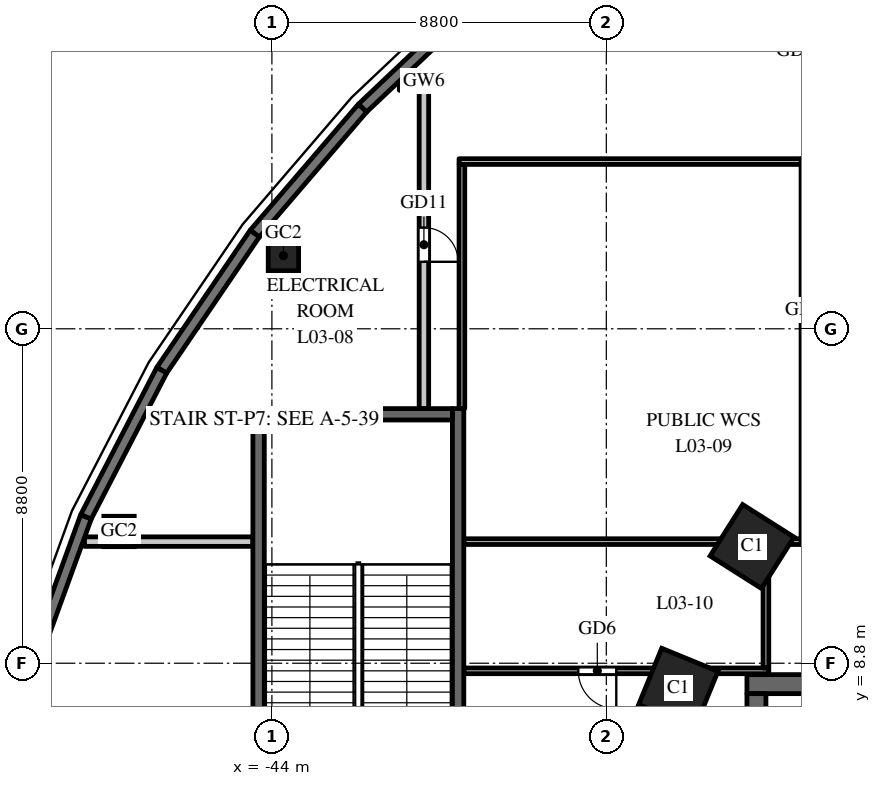
"""IFC4 building model, lengths in metres.
Left out: names, types, materials, properties, quantities, classifications, styles, units other than length and angle.
Written with IfcOpenShell. Run it as: python <this file> out.ifc"""

import sys

from ifc_helpers import new_model, si_unit, direction, frame, frame_2d, origin, origin_2d, place, context, subcontext, project, spatial, rectangle, hollow_rectangle, extrude, element, fill, save


model = new_model("IFC4")
c1 = context("Model", 3, precision=1e-05, world=origin(), true_north=direction((0.0, 1.0)))
c2 = subcontext(c1, "Body", "Model", "MODEL_VIEW")
j1 = project(units=[si_unit("LENGTHUNIT", "METRE"), si_unit("PLANEANGLEUNIT", "RADIAN")], contexts=[c1])
p1 = place(None, origin())
s1 = spatial("IfcSite", under=j1, at=p1, CompositionType="ELEMENT")
p2 = place(p1, origin())
s2 = spatial("IfcBuilding", under=s1, at=p2, CompositionType="ELEMENT")
p3 = place(p2, frame((0.0, 0.0, 19.5)))
s3 = spatial("IfcBuildingStorey", under=s2, at=p3, CompositionType="ELEMENT", Elevation=19.5)
for number, where, z_axis, x_axis in (
    (1, (-31.365, 11.871, 0.0), (0.0, 0.0, 1.0), (-0.535, -0.845, 0.0)),
    (2, (-33.305, 8.149, 0.0), (0.0, 0.0, 1.0), (-0.379, -0.925, 0.0)),
):
    element("IfcColumn", number, at=place(p3, frame(where, z_axis=z_axis, x_axis=x_axis)), inside=s3, PredefinedType="COLUMN", context=c2, shape_type="SweptSolid", body=[
        extrude(rectangle(XDim=1.6, YDim=1.6, at=origin_2d()), origin(), (0.0, 0.0, 1.0), 5.5),
    ])
p4 = place(p3, frame((-16.5, 8.25, 0.0), z_axis=(0.0, 0.0, 1.0), x_axis=(-1.0, 0.0, 0.0)))
e3 = element("IfcWall", 3, at=p4, inside=s3, PredefinedType="SHEAR", context=c2, shape_type="SweptSolid", body=[
    extrude(rectangle(XDim=15.0, YDim=0.5, at=frame_2d((7.5, 0.0))), origin(), (0.0, 0.0, 1.0), 5.25),
])
p5 = place(p4, frame((6.9, 0.0, 0.0)))
e4 = element("IfcOpeningElement", 4, at=p5, cuts=e3, PredefinedType="OPENING", context=c2, shape_type="SweptSolid", body=[
    extrude(rectangle(XDim=1.2, YDim=2.1, at=frame_2d((0.6, 1.05))), frame((0.0, 0.26, 0.0), z_axis=(0.0, -1.0, 0.0), x_axis=(1.0, 0.0, 0.0)), (0.0, 0.0, 1.0), 0.52),
])
p6 = place(p4, frame((12.05, 0.0, 0.0)))
e5 = element("IfcOpeningElement", 5, at=p6, cuts=e3, PredefinedType="OPENING", context=c2, shape_type="SweptSolid", body=[
    extrude(rectangle(XDim=0.9, YDim=2.1, at=frame_2d((0.45, 1.05))), frame((0.0, 0.26, 0.0), z_axis=(0.0, -1.0, 0.0), x_axis=(1.0, 0.0, 0.0)), (0.0, 0.0, 1.0), 0.52),
])
p7 = place(p3, frame((-31.25, -8.0, 0.0), z_axis=(0.0, 0.0, 1.0), x_axis=(0.0, 1.0, 0.0)))
e6 = element("IfcWall", 6, at=p7, inside=s3, PredefinedType="SHEAR", context=c2, shape_type="SweptSolid", body=[
    extrude(rectangle(XDim=16.0, YDim=0.5, at=frame_2d((8.0, 0.0))), origin(), (0.0, 0.0, 1.0), 5.25),
])
for number, where, z_axis, x_axis in (
    (7, (-43.696, 19.525, 0.0), (0.0, 0.0, 1.0), (1.0, 0.0, 0.0)),
    (8, (-48.022, 12.267, 0.0), (0.0, 0.0, 1.0), (1.0, 0.0, 0.0)),
):
    element("IfcColumn", number, at=place(p3, frame(where, z_axis=z_axis, x_axis=x_axis)), inside=s3, PredefinedType="COLUMN", context=c2, shape_type="SweptSolid", body=[
        extrude(hollow_rectangle(XDim=0.8, YDim=0.8, WallThickness=0.04, at=origin_2d()), origin(), (0.0, 0.0, 1.0), 5.5),
    ])
p8 = place(p3, frame((-44.5, 12.0, 0.0), z_axis=(0.0, 0.0, 1.0), x_axis=(-1.0, 0.0, 0.0)))
e9 = element("IfcWall", 9, at=p8, inside=s3, PredefinedType="PARTITIONING", context=c2, shape_type="SweptSolid", body=[
    extrude(rectangle(XDim=4.43, YDim=0.25, at=frame_2d((2.215, 0.0))), origin(), (0.0, 0.0, 1.0), 4.65),
])
p9 = place(p3, frame((-40.646, 24.0, 0.0), z_axis=(0.0, 0.0, 1.0), x_axis=(1.0, 0.0, 0.0)))
e10 = element("IfcWall", 10, at=p9, inside=s3, PredefinedType="PARTITIONING", context=c2, shape_type="SweptSolid", body=[
    extrude(rectangle(XDim=0.521, YDim=0.25, at=frame_2d((0.26, 0.0))), origin(), (0.0, 0.0, 1.0), 5.25),
])
p10 = place(p3, frame((-40.0, 24.125, 0.0), z_axis=(0.0, 0.0, 1.0), x_axis=(0.0, -1.0, 0.0)))
e11 = element("IfcWall", 11, at=p10, inside=s3, PredefinedType="PARTITIONING", context=c2, shape_type="SweptSolid", body=[
    extrude(rectangle(XDim=8.625, YDim=0.25, at=frame_2d((4.312, 0.0))), origin(), (0.0, 0.0, 1.0), 4.25),
])
p11 = place(p10, frame((3.863, 0.0, 0.0)))
e12 = element("IfcOpeningElement", 12, at=p11, cuts=e11, PredefinedType="OPENING", context=c2, shape_type="SweptSolid", body=[
    extrude(rectangle(XDim=0.9, YDim=2.1, at=frame_2d((0.45, 1.05))), frame((0.0, 0.135, 0.0), z_axis=(0.0, -1.0, 0.0), x_axis=(1.0, 0.0, 0.0)), (0.0, 0.0, 1.0), 0.27),
])
p12 = place(p3, frame((-31.065, 12.0, 0.0), z_axis=(0.0, 0.0, 1.0), x_axis=(-1.0, 0.0, 0.0)))
e13 = element("IfcWall", 13, at=p12, inside=s3, PredefinedType="PARTITIONING", context=c2, shape_type="SweptSolid", body=[
    extrude(rectangle(XDim=7.885, YDim=0.15, at=frame_2d((3.942, 0.0))), origin(), (0.0, 0.0, 1.0), 5.25),
])
p13 = place(p3, frame((-30.075, 12.0, 0.0), z_axis=(0.0, 0.0, 1.0), x_axis=(-1.0, 0.0, 0.0)))
e14 = element("IfcWall", 14, at=p13, inside=s3, PredefinedType="PARTITIONING", context=c2, shape_type="SweptSolid", body=[
    extrude(rectangle(XDim=0.86, YDim=0.15, at=frame_2d((0.43, 0.0))), origin(), (0.0, 0.0, 1.0), 5.25),
])
p14 = place(p3, frame((-39.0, 15.5, 0.0), z_axis=(0.0, 0.0, 1.0), x_axis=(0.0, 1.0, 0.0)))
e15 = element("IfcWall", 15, at=p14, inside=s3, PredefinedType="PARTITIONING", context=c2, shape_type="SweptSolid", body=[
    extrude(rectangle(XDim=6.425, YDim=0.15, at=frame_2d((3.212, 0.0))), origin(), (0.0, 0.0, 1.0), 4.25),
])
p15 = place(p3, frame((-39.075, 22.0, 0.0), z_axis=(0.0, 0.0, 1.0), x_axis=(1.0, 0.0, 0.0)))
e16 = element("IfcWall", 16, at=p15, inside=s3, PredefinedType="PARTITIONING", context=c2, shape_type="SweptSolid", body=[
    extrude(rectangle(XDim=9.0, YDim=0.15, at=frame_2d((4.5, 0.0))), origin(), (0.0, 0.0, 1.0), 4.25),
])
p16 = place(p3, frame((-30.925, 8.6, 0.0), z_axis=(0.0, 0.0, 1.0), x_axis=(-1.0, 0.0, 0.0)))
e17 = element("IfcWall", 17, at=p16, inside=s3, PredefinedType="PARTITIONING", context=c2, shape_type="SweptSolid", body=[
    extrude(rectangle(XDim=8.025, YDim=0.15, at=frame_2d((4.012, 0.0))), origin(), (0.0, 0.0, 1.0), 4.35),
])
p17 = place(p16, frame((4.012, 0.0, 0.0)))
e18 = element("IfcOpeningElement", 18, at=p17, cuts=e17, PredefinedType="OPENING", context=c2, shape_type="SweptSolid", body=[
    extrude(rectangle(XDim=1.0, YDim=2.1, at=frame_2d((0.5, 1.05))), frame((0.0, 0.085, 0.0), z_axis=(0.0, -1.0, 0.0), x_axis=(1.0, 0.0, 0.0)), (0.0, 0.0, 1.0), 0.17),
])
p18 = place(p3, frame((-31.0, 11.925, 0.0), z_axis=(0.0, 0.0, 1.0), x_axis=(0.0, -1.0, 0.0)))
e19 = element("IfcWall", 19, at=p18, inside=s3, PredefinedType="PARTITIONING", context=c2, shape_type="SweptSolid", body=[
    extrude(rectangle(XDim=3.25, YDim=0.15, at=frame_2d((1.625, 0.0))), origin(), (0.0, 0.0, 1.0), 5.25),
])
p19 = place(p3, frame((-38.453, 26.401, 0.0), z_axis=(0.0, 0.0, 1.0), x_axis=(-0.72620446032, -0.687478786444, 0.0)))
e20 = element("IfcWall", 20, at=p19, inside=s3, PredefinedType="SOLIDWALL", context=c2, shape_type="SweptSolid", body=[
    extrude(rectangle(XDim=4.356, YDim=0.3, at=frame_2d((2.178, 0.0))), origin(), (0.0, 0.0, 1.0), 5.25),
])
p20 = place(p19, frame((0.608, 0.0, 1.0)))
e21 = element("IfcOpeningElement", 21, at=p20, cuts=e20, PredefinedType="OPENING", context=c2, shape_type="SweptSolid", body=[
    extrude(rectangle(XDim=2.4, YDim=3.0, at=frame_2d((1.2, 1.5))), frame((0.0, 0.16, 0.0), z_axis=(0.0, -1.0, 0.0), x_axis=(1.0, 0.0, 0.0)), (0.0, 0.0, 1.0), 0.32),
])
p21 = place(p3, frame((-41.617, 23.406, 0.0), z_axis=(0.0, 0.0, 1.0), x_axis=(-0.651387059497, -0.758745608699, 0.0)))
e22 = element("IfcWall", 22, at=p21, inside=s3, PredefinedType="SOLIDWALL", context=c2, shape_type="SweptSolid", body=[
    extrude(rectangle(XDim=4.353, YDim=0.3, at=frame_2d((2.176, 0.0))), origin(), (0.0, 0.0, 1.0), 5.25),
])
p22 = place(p21, frame((0.976, 0.0, 1.0)))
e23 = element("IfcOpeningElement", 23, at=p22, cuts=e22, PredefinedType="OPENING", context=c2, shape_type="SweptSolid", body=[
    extrude(rectangle(XDim=2.4, YDim=3.0, at=frame_2d((1.2, 1.5))), frame((0.0, 0.16, 0.0), z_axis=(0.0, -1.0, 0.0), x_axis=(1.0, 0.0, 0.0)), (0.0, 0.0, 1.0), 0.32),
])
p23 = place(p3, frame((-44.452, 20.104, 0.0), z_axis=(0.0, 0.0, 1.0), x_axis=(-0.562667738859, -0.82668314102, 0.0)))
e24 = element("IfcWall", 24, at=p23, inside=s3, PredefinedType="SOLIDWALL", context=c2, shape_type="SweptSolid", body=[
    extrude(rectangle(XDim=4.349, YDim=0.3, at=frame_2d((2.174, 0.0))), origin(), (0.0, 0.0, 1.0), 5.25),
])
p24 = place(p23, frame((0.974, 0.0, 1.0)))
e25 = element("IfcOpeningElement", 25, at=p24, cuts=e24, PredefinedType="OPENING", context=c2, shape_type="SweptSolid", body=[
    extrude(rectangle(XDim=2.4, YDim=3.0, at=frame_2d((1.2, 1.5))), frame((0.0, 0.16, 0.0), z_axis=(0.0, -1.0, 0.0), x_axis=(1.0, 0.0, 0.0)), (0.0, 0.0, 1.0), 0.32),
])
p25 = place(p3, frame((-46.899, 16.508, 0.0), z_axis=(0.0, 0.0, 1.0), x_axis=(-0.459242531468, -0.888310923771, 0.0)))
e26 = element("IfcWall", 26, at=p25, inside=s3, PredefinedType="SOLIDWALL", context=c2, shape_type="SweptSolid", body=[
    extrude(rectangle(XDim=4.345, YDim=0.3, at=frame_2d((2.172, 0.0))), origin(), (0.0, 0.0, 1.0), 5.25),
])
p26 = place(p25, frame((0.972, 0.0, 1.0)))
e27 = element("IfcOpeningElement", 27, at=p26, cuts=e26, PredefinedType="OPENING", context=c2, shape_type="SweptSolid", body=[
    extrude(rectangle(XDim=2.4, YDim=3.0, at=frame_2d((1.2, 1.5))), frame((0.0, 0.16, 0.0), z_axis=(0.0, -1.0, 0.0), x_axis=(1.0, 0.0, 0.0)), (0.0, 0.0, 1.0), 0.32),
])
p27 = place(p3, frame((-48.894, 12.649, 0.0), z_axis=(0.0, 0.0, 1.0), x_axis=(-0.341286990045, -0.939959142956, 0.0)))
e28 = element("IfcWall", 28, at=p27, inside=s3, PredefinedType="SOLIDWALL", context=c2, shape_type="SweptSolid", body=[
    extrude(rectangle(XDim=4.342, YDim=0.3, at=frame_2d((2.171, 0.0))), origin(), (0.0, 0.0, 1.0), 5.25),
])
p28 = place(p27, frame((0.971, 0.0, 1.0)))
e29 = element("IfcOpeningElement", 29, at=p28, cuts=e28, PredefinedType="OPENING", context=c2, shape_type="SweptSolid", body=[
    extrude(rectangle(XDim=2.4, YDim=3.0, at=frame_2d((1.2, 1.5))), frame((0.0, 0.16, 0.0), z_axis=(0.0, -1.0, 0.0), x_axis=(1.0, 0.0, 0.0)), (0.0, 0.0, 1.0), 0.32),
])
for number, where, z_axis, x_axis in (
    (30, (-44.35, 4.5, 0.0), (0.0, 0.0, 1.0), (0.0, 1.0, 0.0)),
    (31, (-39.1, 4.5, 0.0), (0.0, 0.0, 1.0), (0.0, 1.0, 0.0)),
):
    element("IfcWall", number, at=place(p3, frame(where, z_axis=z_axis, x_axis=x_axis)), inside=s3, PredefinedType="SHEAR", context=c2, shape_type="SweptSolid", body=[
        extrude(rectangle(XDim=11.0, YDim=0.3, at=frame_2d((5.5, 0.0))), origin(), (0.0, 0.0, 1.0), 5.25),
    ])
p29 = place(p3, frame((-44.2, 15.35, 0.0), z_axis=(0.0, 0.0, 1.0), x_axis=(1.0, 0.0, 0.0)))
e32 = element("IfcWall", 32, at=p29, inside=s3, PredefinedType="SHEAR", context=c2, shape_type="SweptSolid", body=[
    extrude(rectangle(XDim=4.95, YDim=0.3, at=frame_2d((2.475, 0.0))), origin(), (0.0, 0.0, 1.0), 5.25),
])
p30 = place(p11, origin())
e33 = element("IfcDoor", 33, at=p30, inside=s3, OperationType="SINGLE_SWING_RIGHT", PredefinedType="DOOR", context=c2, shape_type="SweptSolid", body=[
    extrude(rectangle(XDim=0.9, YDim=2.1, at=frame_2d((0.45, 1.05))), frame((0.0, 0.025, 0.0), z_axis=(0.0, -1.0, 0.0), x_axis=(1.0, 0.0, 0.0)), (0.0, 0.0, 1.0), 0.05),
])
fill(e12, e33)
p31 = place(p17, origin())
e34 = element("IfcDoor", 34, at=p31, inside=s3, OperationType="SINGLE_SWING_LEFT", PredefinedType="DOOR", context=c2, shape_type="SweptSolid", body=[
    extrude(rectangle(XDim=1.0, YDim=2.1, at=frame_2d((0.5, 1.05))), frame((0.0, 0.025, 0.0), z_axis=(0.0, -1.0, 0.0), x_axis=(1.0, 0.0, 0.0)), (0.0, 0.0, 1.0), 0.05),
])
fill(e18, e34)
p32 = place(p20, origin())
e35 = element("IfcWindow", 35, at=p32, inside=s3, PartitioningType="SINGLE_PANEL", PredefinedType="WINDOW", context=c2, shape_type="SweptSolid", body=[
    extrude(rectangle(XDim=2.4, YDim=3.0, at=frame_2d((1.2, 1.5))), frame((0.0, 0.03, 0.0), z_axis=(0.0, -1.0, 0.0), x_axis=(1.0, 0.0, 0.0)), (0.0, 0.0, 1.0), 0.06),
])
fill(e21, e35)
p33 = place(p22, origin())
e36 = element("IfcWindow", 36, at=p33, inside=s3, PartitioningType="SINGLE_PANEL", PredefinedType="WINDOW", context=c2, shape_type="SweptSolid", body=[
    extrude(rectangle(XDim=2.4, YDim=3.0, at=frame_2d((1.2, 1.5))), frame((0.0, 0.03, 0.0), z_axis=(0.0, -1.0, 0.0), x_axis=(1.0, 0.0, 0.0)), (0.0, 0.0, 1.0), 0.06),
])
fill(e23, e36)
p34 = place(p24, origin())
e37 = element("IfcWindow", 37, at=p34, inside=s3, PartitioningType="SINGLE_PANEL", PredefinedType="WINDOW", context=c2, shape_type="SweptSolid", body=[
    extrude(rectangle(XDim=2.4, YDim=3.0, at=frame_2d((1.2, 1.5))), frame((0.0, 0.03, 0.0), z_axis=(0.0, -1.0, 0.0), x_axis=(1.0, 0.0, 0.0)), (0.0, 0.0, 1.0), 0.06),
])
fill(e25, e37)
p35 = place(p26, origin())
e38 = element("IfcWindow", 38, at=p35, inside=s3, PartitioningType="SINGLE_PANEL", PredefinedType="WINDOW", context=c2, shape_type="SweptSolid", body=[
    extrude(rectangle(XDim=2.4, YDim=3.0, at=frame_2d((1.2, 1.5))), frame((0.0, 0.03, 0.0), z_axis=(0.0, -1.0, 0.0), x_axis=(1.0, 0.0, 0.0)), (0.0, 0.0, 1.0), 0.06),
])
fill(e27, e38)
p36 = place(p28, origin())
e39 = element("IfcWindow", 39, at=p36, inside=s3, PartitioningType="SINGLE_PANEL", PredefinedType="WINDOW", context=c2, shape_type="SweptSolid", body=[
    extrude(rectangle(XDim=2.4, YDim=3.0, at=frame_2d((1.2, 1.5))), frame((0.0, 0.03, 0.0), z_axis=(0.0, -1.0, 0.0), x_axis=(1.0, 0.0, 0.0)), (0.0, 0.0, 1.0), 0.06),
])
fill(e29, e39)
save(model, sys.argv[1])
